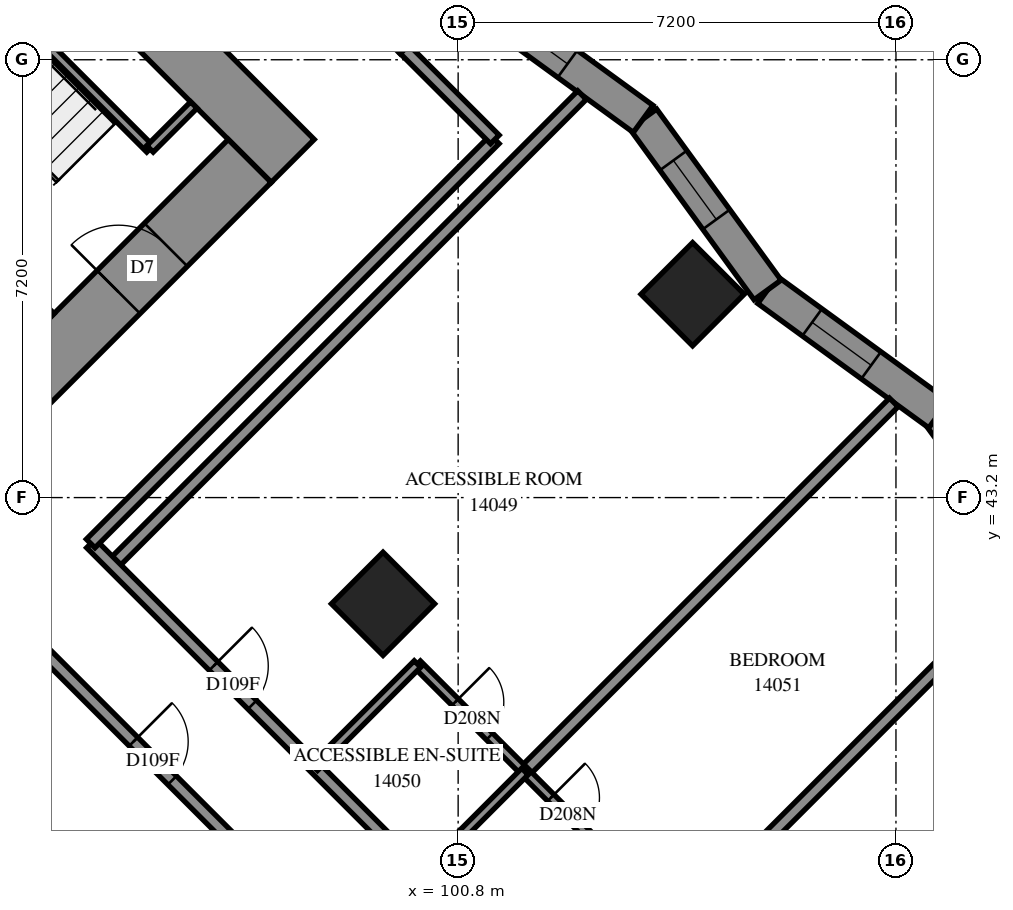
"""IFC4 building model, lengths in metres.
Left out: names, types, materials, properties, quantities, classifications, styles, units other than length and angle.
Written with IfcOpenShell. Run it as: python <this file> out.ifc"""

import sys

from ifc_helpers import new_model, si_unit, direction, frame, frame_2d, origin, origin_2d, place, context, subcontext, project, spatial, polyline, rectangle, outline, extrude, element, fill, save


model = new_model("IFC4")
c1 = context("Model", 3, precision=1e-05, world=origin(), true_north=direction((0.0, 1.0)))
c2 = subcontext(c1, "Body", "Model", "MODEL_VIEW")
j1 = project(units=[si_unit("LENGTHUNIT", "METRE"), si_unit("PLANEANGLEUNIT", "RADIAN")], contexts=[c1])
p1 = place(None, origin())
s1 = spatial("IfcSite", under=j1, at=p1, CompositionType="ELEMENT")
p2 = place(p1, origin())
s2 = spatial("IfcBuilding", under=s1, at=p2, CompositionType="ELEMENT")
p3 = place(p2, frame((0.0, 0.0, 54.2)))
s3 = spatial("IfcBuildingStorey", under=s2, at=p3, CompositionType="ELEMENT", Elevation=54.2)
for number, where, z_axis, x_axis in (
    (1, (104.656, 46.544, 0.0), (0.0, 0.0, 1.0), (0.707, -0.707, 0.0)),
    (2, (99.565, 41.453, 0.0), (0.0, 0.0, 1.0), (0.707, -0.707, 0.0)),
):
    element("IfcColumn", number, at=place(p3, frame(where, z_axis=z_axis, x_axis=x_axis)), inside=s3, PredefinedType="COLUMN", context=c2, shape_type="SweptSolid", body=[
        extrude(rectangle(XDim=1.2, YDim=1.2, at=origin_2d()), origin(), (0.0, 0.0, 1.0), 3.1),
    ])
p4 = place(p3, frame((86.483, 60.333, -0.3), z_axis=(0.0, 0.0, 1.0), x_axis=(0.70710983, -0.7071037324, 0.0)))
e3 = element("IfcWall", 3, at=p4, inside=s3, PredefinedType="SHEAR", context=c2, shape_type="SweptSolid", body=[
    extrude(rectangle(XDim=16.4, YDim=1.0, at=frame_2d((8.2, 0.0))), origin(), (0.0, 0.0, 1.0), 2.7),
])
p5 = place(p4, frame((11.0, 0.0, 0.3)))
e4 = element("IfcOpeningElement", 4, at=p5, cuts=e3, PredefinedType="OPENING", context=c2, shape_type="SweptSolid", body=[
    extrude(rectangle(XDim=0.8, YDim=2.1, at=frame_2d((0.4, 1.05))), frame((0.0, 0.51, 0.0), z_axis=(0.0, -1.0, 0.0), x_axis=(1.0, 0.0, 0.0)), (0.0, 0.0, 1.0), 1.02),
])
p6 = place(p3, frame((87.19, 38.554, -0.3), z_axis=(0.0, 0.0, 1.0), x_axis=(0.707103309, 0.7071102534, 0.0)))
e5 = element("IfcWall", 5, at=p6, inside=s3, PredefinedType="SHEAR", context=c2, shape_type="SweptSolid", body=[
    extrude(rectangle(XDim=14.4, YDim=1.0, at=frame_2d((7.2, 0.0))), origin(), (0.0, 0.0, 1.0), 2.7),
])
p7 = place(p6, frame((4.55, 0.0, 0.3)))
e6 = element("IfcOpeningElement", 6, at=p7, cuts=e5, PredefinedType="OPENING", context=c2, shape_type="SweptSolid", body=[
    extrude(rectangle(XDim=1.1, YDim=2.1, at=frame_2d((0.55, 1.05))), frame((0.0, 0.51, 0.0), z_axis=(0.0, -1.0, 0.0), x_axis=(1.0, 0.0, 0.0)), (0.0, 0.0, 1.0), 1.02),
])
p8 = place(p6, frame((11.35, 0.0, 0.3)))
e7 = element("IfcOpeningElement", 7, at=p8, cuts=e5, PredefinedType="OPENING", context=c2, shape_type="SweptSolid", body=[
    extrude(rectangle(XDim=1.1, YDim=2.1, at=frame_2d((0.55, 1.05))), frame((0.0, 0.51, 0.0), z_axis=(0.0, -1.0, 0.0), x_axis=(1.0, 0.0, 0.0)), (0.0, 0.0, 1.0), 1.02),
])
p9 = place(p3, frame((88.958, 51.211, 0.0), z_axis=(0.0, 0.0, 1.0), x_axis=(0.7070998367, -0.7071137256, 0.0)))
e8 = element("IfcWall", 8, at=p9, inside=s3, PredefinedType="SOLIDWALL", context=c2, shape_type="SweptSolid", body=[
    extrude(rectangle(XDim=7.2, YDim=0.3, at=frame_2d((3.6, 0.0))), origin(), (0.0, 0.0, 1.0), 3.1),
])
p10 = place(p3, frame((110.747, 41.756, 0.0), z_axis=(0.0, 0.0, 1.0), x_axis=(-0.5882793931, 0.8086577494, 0.0)))
e9 = element("IfcWall", 9, at=p10, inside=s3, PredefinedType="SOLIDWALL", context=c2, shape_type="SweptSolid", body=[
    extrude(outline(polyline([(0.043, -0.275), (3.522, -0.275), (3.435, 0.275), (-0.043, 0.275), (0.043, -0.275)])), origin(), (0.0, 0.0, 1.0), 3.1),
])
p11 = place(p10, frame((1.267, 0.0, 0.5)))
e10 = element("IfcOpeningElement", 10, at=p11, cuts=e9, PredefinedType="OPENING", context=c2, shape_type="SweptSolid", body=[
    extrude(rectangle(XDim=1.2, YDim=2.45, at=frame_2d((0.6, 1.225))), frame((0.0, 0.285, 0.0), z_axis=(0.0, -1.0, 0.0), x_axis=(1.0, 0.0, 0.0)), (0.0, 0.0, 1.0), 0.57),
])
p12 = place(p3, frame((108.701, 44.569, 0.0), z_axis=(0.0, 0.0, 1.0), x_axis=(-0.8086577494, 0.5882793931, 0.0)))
e11 = element("IfcWall", 11, at=p12, inside=s3, PredefinedType="SOLIDWALL", context=c2, shape_type="SweptSolid", body=[
    extrude(outline(polyline([(-0.043, -0.275), (3.435, -0.275), (3.522, 0.275), (0.043, 0.275), (-0.043, -0.275)])), origin(), (0.0, 0.0, 1.0), 3.1),
])
p13 = place(p12, frame((1.372, 0.0, 0.5)))
e12 = element("IfcOpeningElement", 12, at=p13, cuts=e11, PredefinedType="OPENING", context=c2, shape_type="SweptSolid", body=[
    extrude(rectangle(XDim=1.2, YDim=2.45, at=frame_2d((0.6, 1.225))), frame((0.0, 0.285, 0.0), z_axis=(0.0, -1.0, 0.0), x_axis=(1.0, 0.0, 0.0)), (0.0, 0.0, 1.0), 0.57),
])
p14 = place(p3, frame((105.889, 46.615, 0.0), z_axis=(0.0, 0.0, 1.0), x_axis=(-0.5882793931, 0.8086577494, 0.0)))
e13 = element("IfcWall", 13, at=p14, inside=s3, PredefinedType="SOLIDWALL", context=c2, shape_type="SweptSolid", body=[
    extrude(outline(polyline([(0.043, -0.275), (3.522, -0.275), (3.435, 0.275), (-0.043, 0.275), (0.043, -0.275)])), origin(), (0.0, 0.0, 1.0), 3.1),
])
p15 = place(p14, frame((1.433, 0.0, 0.5)))
e14 = element("IfcOpeningElement", 14, at=p15, cuts=e13, PredefinedType="OPENING", context=c2, shape_type="SweptSolid", body=[
    extrude(rectangle(XDim=1.2, YDim=2.45, at=frame_2d((0.6, 1.225))), frame((0.0, 0.285, 0.0), z_axis=(0.0, -1.0, 0.0), x_axis=(1.0, 0.0, 0.0)), (0.0, 0.0, 1.0), 0.57),
])
p16 = place(p3, frame((103.843, 49.427, 0.0), z_axis=(0.0, 0.0, 1.0), x_axis=(-0.8086676991, 0.5882657159, 0.0)))
e15 = element("IfcWall", 15, at=p16, inside=s3, PredefinedType="SOLIDWALL", context=c2, shape_type="SweptSolid", body=[
    extrude(outline(polyline([(-0.043, -0.275), (3.435, -0.275), (3.522, 0.275), (0.043, 0.275), (-0.043, -0.275)])), origin(), (0.0, 0.0, 1.0), 3.1),
])
p17 = place(p16, frame((1.538, 0.0, 0.5)))
e16 = element("IfcOpeningElement", 16, at=p17, cuts=e15, PredefinedType="OPENING", context=c2, shape_type="SweptSolid", body=[
    extrude(rectangle(XDim=1.2, YDim=2.45, at=frame_2d((0.6, 1.225))), frame((0.0, 0.285, 0.0), z_axis=(0.0, -1.0, 0.0), x_axis=(1.0, 0.0, 0.0)), (0.0, 0.0, 1.0), 0.57),
])
p18 = place(p3, frame((91.313, 53.354, 0.0), z_axis=(0.0, 0.0, 1.0), x_axis=(0.7071147811, -0.7070987812, 0.0)))
e17 = element("IfcWall", 17, at=p18, inside=s3, PredefinedType="PARTITIONING", context=c2, shape_type="SweptSolid", body=[
    extrude(rectangle(XDim=6.25, YDim=0.15, at=frame_2d((3.125, 0.0))), origin(), (0.0, 0.0, 1.0), 3.1),
])
p19 = place(p3, frame((95.732, 48.934, 0.0), z_axis=(0.0, 0.0, 1.0), x_axis=(0.7071067812, 0.7071067812, 0.0)))
e18 = element("IfcWall", 18, at=p19, inside=s3, PredefinedType="PARTITIONING", context=c2, shape_type="SweptSolid", body=[
    extrude(rectangle(XDim=1.02, YDim=0.15, at=frame_2d((0.51, 0.0))), origin(), (0.0, 0.0, 1.0), 3.1),
])
p20 = place(p3, frame((93.481, 41.167, 0.0), z_axis=(0.0, 0.0, 1.0), x_axis=(0.7071067812, -0.7071067812, 0.0)))
e19 = element("IfcWall", 19, at=p20, inside=s3, PredefinedType="PARTITIONING", context=c2, shape_type="SweptSolid", body=[
    extrude(rectangle(XDim=25.699, YDim=0.2, at=frame_2d((12.85, 0.0))), origin(), (0.0, 0.0, 1.0), 3.1),
])
p21 = place(p20, frame((2.8, 0.0, 0.0)))
e20 = element("IfcOpeningElement", 20, at=p21, cuts=e19, PredefinedType="OPENING", context=c2, shape_type="SweptSolid", body=[
    extrude(rectangle(XDim=0.9, YDim=2.1, at=frame_2d((0.45, 1.05))), frame((0.0, 0.11, 0.0), z_axis=(0.0, -1.0, 0.0), x_axis=(1.0, 0.0, 0.0)), (0.0, 0.0, 1.0), 0.22),
])
p22 = place(p20, frame((9.948, 0.0, 0.0)))
e21 = element("IfcOpeningElement", 21, at=p22, cuts=e19, PredefinedType="OPENING", context=c2, shape_type="SweptSolid", body=[
    extrude(rectangle(XDim=0.9, YDim=2.1, at=frame_2d((0.45, 1.05))), frame((0.0, 0.11, 0.0), z_axis=(0.0, -1.0, 0.0), x_axis=(1.0, 0.0, 0.0)), (0.0, 0.0, 1.0), 0.22),
])
p23 = place(p20, frame((11.7, 0.0, 0.0)))
e22 = element("IfcOpeningElement", 22, at=p23, cuts=e19, PredefinedType="OPENING", context=c2, shape_type="SweptSolid", body=[
    extrude(rectangle(XDim=0.9, YDim=2.1, at=frame_2d((0.45, 1.05))), frame((0.0, 0.11, 0.0), z_axis=(0.0, -1.0, 0.0), x_axis=(1.0, 0.0, 0.0)), (0.0, 0.0, 1.0), 0.22),
])
p24 = place(p20, frame((17.25, 0.0, 0.0)))
e23 = element("IfcOpeningElement", 23, at=p24, cuts=e19, PredefinedType="OPENING", context=c2, shape_type="SweptSolid", body=[
    extrude(rectangle(XDim=0.9, YDim=2.1, at=frame_2d((0.45, 1.05))), frame((0.0, 0.11, 0.0), z_axis=(0.0, -1.0, 0.0), x_axis=(1.0, 0.0, 0.0)), (0.0, 0.0, 1.0), 0.22),
])
p25 = place(p20, frame((22.82, 0.0, 0.0)))
e24 = element("IfcOpeningElement", 24, at=p25, cuts=e19, PredefinedType="OPENING", context=c2, shape_type="SweptSolid", body=[
    extrude(rectangle(XDim=0.9, YDim=2.1, at=frame_2d((0.45, 1.05))), frame((0.0, 0.11, 0.0), z_axis=(0.0, -1.0, 0.0), x_axis=(1.0, 0.0, 0.0)), (0.0, 0.0, 1.0), 0.22),
])
p26 = place(p3, frame((105.292, 31.908, 0.0), z_axis=(0.0, 0.0, 1.0), x_axis=(0.7071067812, 0.7071067812, 0.0)))
e25 = element("IfcWall", 25, at=p26, inside=s3, PredefinedType="PARTITIONING", context=c2, shape_type="SweptSolid", body=[
    extrude(rectangle(XDim=11.033, YDim=0.2, at=frame_2d((5.516, 0.0))), origin(), (0.0, 0.0, 1.0), 3.1),
])
p27 = place(p3, frame((95.109, 42.091, 0.0), z_axis=(0.0, 0.0, 1.0), x_axis=(0.7071113562, 0.7071022062, 0.0)))
e26 = element("IfcWall", 26, at=p27, inside=s3, PredefinedType="PARTITIONING", context=c2, shape_type="SweptSolid", body=[
    extrude(rectangle(XDim=10.929, YDim=0.2, at=frame_2d((5.465, 0.0))), origin(), (0.0, 0.0, 1.0), 3.1),
])
p28 = place(p3, frame((94.761, 42.446, 0.0), z_axis=(0.0, 0.0, 1.0), x_axis=(0.7071067812, -0.7071067812, 0.0)))
e27 = element("IfcWall", 27, at=p28, inside=s3, PredefinedType="PARTITIONING", context=c2, shape_type="SweptSolid", body=[
    extrude(rectangle(XDim=9.597, YDim=0.2, at=frame_2d((4.798, 0.0))), origin(), (0.0, 0.0, 1.0), 3.1),
])
p29 = place(p28, frame((2.851, 0.0, 0.0)))
e28 = element("IfcOpeningElement", 28, at=p29, cuts=e27, PredefinedType="OPENING", context=c2, shape_type="SweptSolid", body=[
    extrude(rectangle(XDim=0.9, YDim=2.1, at=frame_2d((0.45, 1.05))), frame((0.0, 0.11, 0.0), z_axis=(0.0, -1.0, 0.0), x_axis=(1.0, 0.0, 0.0)), (0.0, 0.0, 1.0), 0.22),
])
p30 = place(p3, frame((94.757, 42.445, 0.0), z_axis=(0.0, 0.0, 1.0), x_axis=(0.7071067812, 0.7071067812, 0.0)))
e29 = element("IfcWall", 29, at=p30, inside=s3, PredefinedType="PARTITIONING", context=c2, shape_type="SweptSolid", body=[
    extrude(rectangle(XDim=9.399, YDim=0.2, at=frame_2d((4.699, 0.0))), origin(), (0.0, 0.0, 1.0), 3.1),
])
p31 = place(p3, frame((101.896, 38.698, 0.0), z_axis=(0.0, 0.0, 1.0), x_axis=(0.7072233116, 0.7069902315, 0.0)))
e30 = element("IfcWall", 30, at=p31, inside=s3, PredefinedType="PARTITIONING", context=c2, shape_type="SweptSolid", body=[
    extrude(rectangle(XDim=8.581, YDim=0.2, at=frame_2d((4.29, 0.0))), origin(), (0.0, 0.0, 1.0), 3.1),
])
p32 = place(p3, frame((105.255, 36.963, 0.0), z_axis=(0.0, 0.0, 1.0), x_axis=(0.7071067812, 0.7071067812, 0.0)))
e31 = element("IfcWall", 31, at=p32, inside=s3, PredefinedType="PARTITIONING", context=c2, shape_type="SweptSolid", body=[
    extrude(rectangle(XDim=5.504, YDim=0.2, at=frame_2d((2.752, 0.0))), origin(), (0.0, 0.0, 1.0), 3.1),
])
p33 = place(p3, frame((100.126, 40.461, 0.0), z_axis=(0.0, 0.0, 1.0), x_axis=(0.7071067812, -0.7071067812, 0.0)))
e32 = element("IfcWall", 32, at=p33, inside=s3, PredefinedType="PARTITIONING", context=c2, shape_type="SweptSolid", body=[
    extrude(rectangle(XDim=4.401, YDim=0.15, at=frame_2d((2.2, 0.0))), origin(), (0.0, 0.0, 1.0), 3.1),
])
p34 = place(p33, frame((0.883, 0.0, 0.0)))
e33 = element("IfcOpeningElement", 33, at=p34, cuts=e32, PredefinedType="OPENING", context=c2, shape_type="SweptSolid", body=[
    extrude(rectangle(XDim=0.8, YDim=2.1, at=frame_2d((0.4, 1.05))), frame((0.0, 0.085, 0.0), z_axis=(0.0, -1.0, 0.0), x_axis=(1.0, 0.0, 0.0)), (0.0, 0.0, 1.0), 0.17),
])
p35 = place(p33, frame((3.108, 0.0, 0.0)))
e34 = element("IfcOpeningElement", 34, at=p35, cuts=e32, PredefinedType="OPENING", context=c2, shape_type="SweptSolid", body=[
    extrude(rectangle(XDim=0.8, YDim=2.1, at=frame_2d((0.4, 1.05))), frame((0.0, 0.085, 0.0), z_axis=(0.0, -1.0, 0.0), x_axis=(1.0, 0.0, 0.0)), (0.0, 0.0, 1.0), 0.17),
])
for number, where, z_axis, x_axis in (
    (35, (98.435, 38.765, 0.0), (0.0, 0.0, 1.0), (0.707, 0.708, 0.0)),
    (36, (100.203, 36.997, 0.0), (0.0, 0.0, 1.0), (0.707, 0.708, 0.0)),
):
    element("IfcWall", number, at=place(p3, frame(where, z_axis=z_axis, x_axis=x_axis)), inside=s3, PredefinedType="PARTITIONING", context=c2, shape_type="SweptSolid", body=[
        extrude(rectangle(XDim=2.4, YDim=0.15, at=frame_2d((1.2, 0.0))), origin(), (0.0, 0.0, 1.0), 3.1),
    ])
p36 = place(p3, frame((99.918, 50.574, 0.0), z_axis=(0.0, 0.0, 1.0), x_axis=(0.7075827869, -0.7066304548, 0.0)))
e37 = element("IfcWall", 37, at=p36, inside=s3, PredefinedType="PARTITIONING", context=c2, shape_type="SweptSolid", body=[
    extrude(rectangle(XDim=2.1, YDim=0.2, at=frame_2d((1.05, 0.0))), origin(), (0.0, 0.0, 1.0), 3.1),
])
p37 = place(p3, frame((99.453, 51.033, 0.0), z_axis=(0.0, 0.0, 1.0), x_axis=(0.7071067812, -0.7071067812, 0.0)))
e38 = element("IfcWall", 38, at=p37, inside=s3, PredefinedType="PARTITIONING", context=c2, shape_type="SweptSolid", body=[
    extrude(rectangle(XDim=0.653, YDim=0.2, at=frame_2d((0.327, 0.0))), origin(), (0.0, 0.0, 1.0), 3.1),
])
p38 = place(p13, origin())
e39 = element("IfcWindow", 39, at=p38, inside=s3, PartitioningType="SINGLE_PANEL", PredefinedType="WINDOW", context=c2, shape_type="SweptSolid", body=[
    extrude(rectangle(XDim=1.2, YDim=2.45, at=frame_2d((0.6, 1.225))), frame((0.0, 0.155, 0.0), z_axis=(0.0, -1.0, 0.0), x_axis=(1.0, 0.0, 0.0)), (0.0, 0.0, 1.0), 0.06),
])
fill(e12, e39)
p39 = place(p15, origin())
e40 = element("IfcWindow", 40, at=p39, inside=s3, PartitioningType="SINGLE_PANEL", PredefinedType="WINDOW", context=c2, shape_type="SweptSolid", body=[
    extrude(rectangle(XDim=1.2, YDim=2.45, at=frame_2d((0.6, 1.225))), frame((0.0, 0.155, 0.0), z_axis=(0.0, -1.0, 0.0), x_axis=(1.0, 0.0, 0.0)), (0.0, 0.0, 1.0), 0.06),
])
fill(e14, e40)
p40 = place(p17, origin())
e41 = element("IfcWindow", 41, at=p40, inside=s3, PartitioningType="SINGLE_PANEL", PredefinedType="WINDOW", context=c2, shape_type="SweptSolid", body=[
    extrude(rectangle(XDim=1.2, YDim=2.45, at=frame_2d((0.6, 1.225))), frame((0.0, 0.155, 0.0), z_axis=(0.0, -1.0, 0.0), x_axis=(1.0, 0.0, 0.0)), (0.0, 0.0, 1.0), 0.06),
])
fill(e16, e41)
p41 = place(p8, origin())
e42 = element("IfcDoor", 42, at=p41, inside=s3, OperationType="SINGLE_SWING_RIGHT", PredefinedType="DOOR", context=c2, shape_type="SweptSolid", body=[
    extrude(rectangle(XDim=1.1, YDim=2.1, at=frame_2d((0.55, 1.05))), frame((0.0, 0.025, 0.0), z_axis=(0.0, -1.0, 0.0), x_axis=(1.0, 0.0, 0.0)), (0.0, 0.0, 1.0), 0.05),
])
fill(e7, e42)
p42 = place(p29, origin())
e43 = element("IfcDoor", 43, at=p42, inside=s3, OperationType="SINGLE_SWING_RIGHT", PredefinedType="DOOR", context=c2, shape_type="SweptSolid", body=[
    extrude(rectangle(XDim=0.9, YDim=2.1, at=frame_2d((0.45, 1.05))), frame((0.0, 0.025, 0.0), z_axis=(0.0, -1.0, 0.0), x_axis=(1.0, 0.0, 0.0)), (0.0, 0.0, 1.0), 0.05),
])
fill(e28, e43)
p43 = place(p34, origin())
e44 = element("IfcDoor", 44, at=p43, inside=s3, OperationType="SINGLE_SWING_RIGHT", PredefinedType="DOOR", context=c2, shape_type="SweptSolid", body=[
    extrude(rectangle(XDim=0.8, YDim=2.1, at=frame_2d((0.4, 1.05))), frame((0.0, 0.025, 0.0), z_axis=(0.0, -1.0, 0.0), x_axis=(1.0, 0.0, 0.0)), (0.0, 0.0, 1.0), 0.05),
])
fill(e33, e44)
p44 = place(p35, origin())
e45 = element("IfcDoor", 45, at=p44, inside=s3, OperationType="SINGLE_SWING_RIGHT", PredefinedType="DOOR", context=c2, shape_type="SweptSolid", body=[
    extrude(rectangle(XDim=0.8, YDim=2.1, at=frame_2d((0.4, 1.05))), frame((0.0, 0.025, 0.0), z_axis=(0.0, -1.0, 0.0), x_axis=(1.0, 0.0, 0.0)), (0.0, 0.0, 1.0), 0.05),
])
fill(e34, e45)
p45 = place(p21, origin())
e46 = element("IfcDoor", 46, at=p45, inside=s3, OperationType="SINGLE_SWING_LEFT", PredefinedType="DOOR", context=c2, shape_type="SweptSolid", body=[
    extrude(rectangle(XDim=0.9, YDim=2.1, at=frame_2d((0.45, 1.05))), frame((0.0, 0.025, 0.0), z_axis=(0.0, -1.0, 0.0), x_axis=(1.0, 0.0, 0.0)), (0.0, 0.0, 1.0), 0.05),
])
fill(e20, e46)
save(model, sys.argv[1])
